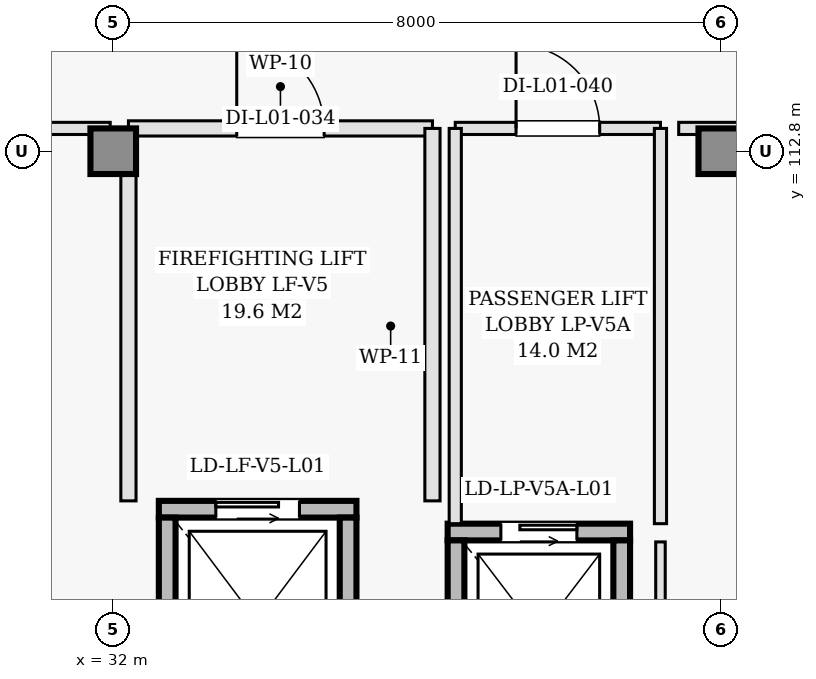
"""IFC4 building model, lengths in metres.
Left out: names, types, materials, properties, quantities, classifications, styles, units other than length and angle.
Written with IfcOpenShell. Run it as: python <this file> out.ifc"""

import sys

from ifc_helpers import new_model, si_unit, direction, frame, frame_2d, origin, origin_2d, place, context, subcontext, project, spatial, rectangle, extrude, element, fill, save


model = new_model("IFC4")
c1 = context("Model", 3, precision=1e-05, world=origin(), true_north=direction((0.0, 1.0)))
c2 = subcontext(c1, "Body", "Model", "MODEL_VIEW")
j1 = project(units=[si_unit("LENGTHUNIT", "METRE"), si_unit("PLANEANGLEUNIT", "RADIAN")], contexts=[c1])
p1 = place(None, origin())
s1 = spatial("IfcSite", under=j1, at=p1, CompositionType="ELEMENT")
p2 = place(p1, origin())
s2 = spatial("IfcBuilding", under=s1, at=p2, CompositionType="ELEMENT")
p3 = place(p2, frame((0.0, 0.0, 4.8)))
s3 = spatial("IfcBuildingStorey", under=s2, at=p3, CompositionType="ELEMENT", Elevation=4.8)
for number, where, z_axis, x_axis in (
    (1, (32.0, 112.8, 0.0), (0.0, 0.0, 1.0), (1.0, 0.0, 0.0)),
    (2, (40.0, 112.8, 0.0), (0.0, 0.0, 1.0), (1.0, 0.0, 0.0)),
):
    element("IfcColumn", number, at=place(p3, frame(where, z_axis=z_axis, x_axis=x_axis)), inside=s3, PredefinedType="COLUMN", context=c2, shape_type="SweptSolid", body=[
        extrude(rectangle(XDim=0.6, YDim=0.6, at=origin_2d()), origin(), (0.0, 0.0, 1.0), 4.8),
    ])
p4 = place(p3, frame((32.6, 108.09, 0.0), z_axis=(0.0, 0.0, 1.0), x_axis=(1.0, 0.0, 0.0)))
e3 = element("IfcWall", 3, at=p4, inside=s3, PredefinedType="SHEAR", context=c2, shape_type="SweptSolid", body=[
    extrude(rectangle(XDim=2.6, YDim=0.22, at=frame_2d((1.3, 0.0))), origin(), (0.0, 0.0, 1.0), 4.48),
])
p5 = place(p4, frame((0.75, 0.0, 0.0)))
e4 = element("IfcOpeningElement", 4, at=p5, cuts=e3, PredefinedType="OPENING", context=c2, shape_type="SweptSolid", body=[
    extrude(rectangle(XDim=1.1, YDim=2.15, at=frame_2d((0.55, 1.075))), frame((0.0, 0.12, 0.0), z_axis=(0.0, -1.0, 0.0), x_axis=(1.0, 0.0, 0.0)), (0.0, 0.0, 1.0), 0.24),
])
for number, where, z_axis, x_axis in (
    (5, (32.71, 105.22, 0.0), (0.0, 0.0, 1.0), (0.0, 1.0, 0.0)),
    (6, (35.09, 105.22, 0.0), (0.0, 0.0, 1.0), (0.0, 1.0, 0.0)),
):
    element("IfcWall", number, at=place(p3, frame(where, z_axis=z_axis, x_axis=x_axis)), inside=s3, PredefinedType="SHEAR", context=c2, shape_type="SweptSolid", body=[
        extrude(rectangle(XDim=2.76, YDim=0.22, at=frame_2d((1.38, 0.0))), origin(), (0.0, 0.0, 1.0), 4.48),
    ])
p6 = place(p3, frame((32.2, 113.1, 0.0), z_axis=(0.0, 0.0, 1.0), x_axis=(1.0, 0.0, 0.0)))
e7 = element("IfcWall", 7, at=p6, inside=s3, PredefinedType="PARTITIONING", context=c2, shape_type="SweptSolid", body=[
    extrude(rectangle(XDim=4.0, YDim=0.2, at=frame_2d((2.0, 0.0))), origin(), (0.0, 0.0, 1.0), 3.715),
])
p7 = place(p6, frame((1.425, 0.0, 0.0)))
e8 = element("IfcOpeningElement", 8, at=p7, cuts=e7, PredefinedType="OPENING", context=c2, shape_type="SweptSolid", body=[
    extrude(rectangle(XDim=1.15, YDim=2.15, at=frame_2d((0.575, 1.075))), frame((0.0, 0.11, 0.0), z_axis=(0.0, -1.0, 0.0), x_axis=(1.0, 0.0, 0.0)), (0.0, 0.0, 1.0), 0.22),
])
for number, where, z_axis, x_axis in (
    (9, (32.2, 108.2, 0.0), (0.0, 0.0, 1.0), (0.0, 1.0, 0.0)),
    (10, (36.2, 108.2, 0.0), (0.0, 0.0, 1.0), (0.0, 1.0, 0.0)),
):
    element("IfcWall", number, at=place(p3, frame(where, z_axis=z_axis, x_axis=x_axis)), inside=s3, PredefinedType="PARTITIONING", context=c2, shape_type="SweptSolid", body=[
        extrude(rectangle(XDim=4.9, YDim=0.2, at=frame_2d((2.45, 0.0))), origin(), (0.0, 0.0, 1.0), 3.715),
    ])
p8 = place(p3, frame((36.4, 107.79, 0.0), z_axis=(0.0, 0.0, 1.0), x_axis=(1.0, 0.0, 0.0)))
e11 = element("IfcWall", 11, at=p8, inside=s3, PredefinedType="SHEAR", context=c2, shape_type="SweptSolid", body=[
    extrude(rectangle(XDim=2.4, YDim=0.22, at=frame_2d((1.2, 0.0))), origin(), (0.0, 0.0, 1.0), 4.48),
])
p9 = place(p8, frame((0.7, 0.0, 0.0)))
e12 = element("IfcOpeningElement", 12, at=p9, cuts=e11, PredefinedType="OPENING", context=c2, shape_type="SweptSolid", body=[
    extrude(rectangle(XDim=1.0, YDim=2.15, at=frame_2d((0.5, 1.075))), frame((0.0, 0.12, 0.0), z_axis=(0.0, -1.0, 0.0), x_axis=(1.0, 0.0, 0.0)), (0.0, 0.0, 1.0), 0.24),
])
for number, where, z_axis, x_axis in (
    (13, (36.51, 105.22, 0.0), (0.0, 0.0, 1.0), (0.0, 1.0, 0.0)),
    (14, (38.69, 105.22, 0.0), (0.0, 0.0, 1.0), (0.0, 1.0, 0.0)),
):
    element("IfcWall", number, at=place(p3, frame(where, z_axis=z_axis, x_axis=x_axis)), inside=s3, PredefinedType="SHEAR", context=c2, shape_type="SweptSolid", body=[
        extrude(rectangle(XDim=2.46, YDim=0.22, at=frame_2d((1.23, 0.0))), origin(), (0.0, 0.0, 1.0), 4.48),
    ])
p10 = place(p3, frame((36.5, 113.1, 0.0), z_axis=(0.0, 0.0, 1.0), x_axis=(1.0, 0.0, 0.0)))
e15 = element("IfcWall", 15, at=p10, inside=s3, PredefinedType="PARTITIONING", context=c2, shape_type="SweptSolid", body=[
    extrude(rectangle(XDim=2.7, YDim=0.16, at=frame_2d((1.35, 0.0))), origin(), (0.0, 0.0, 1.0), 3.715),
])
p11 = place(p10, frame((0.8, 0.0, 0.0)))
e16 = element("IfcOpeningElement", 16, at=p11, cuts=e15, PredefinedType="OPENING", context=c2, shape_type="SweptSolid", body=[
    extrude(rectangle(XDim=1.1, YDim=2.15, at=frame_2d((0.55, 1.075))), frame((0.0, 0.09, 0.0), z_axis=(0.0, -1.0, 0.0), x_axis=(1.0, 0.0, 0.0)), (0.0, 0.0, 1.0), 0.18),
])
for number, where, z_axis, x_axis in (
    (17, (36.5, 107.9, 0.0), (0.0, 0.0, 1.0), (0.0, 1.0, 0.0)),
    (18, (39.2, 107.9, 0.0), (0.0, 0.0, 1.0), (0.0, 1.0, 0.0)),
):
    element("IfcWall", number, at=place(p3, frame(where, z_axis=z_axis, x_axis=x_axis)), inside=s3, PredefinedType="PARTITIONING", context=c2, shape_type="SweptSolid", body=[
        extrude(rectangle(XDim=5.2, YDim=0.16, at=frame_2d((2.6, 0.0))), origin(), (0.0, 0.0, 1.0), 3.715),
    ])
p12 = place(p3, frame((39.44, 113.1, 0.0), z_axis=(0.0, 0.0, 1.0), x_axis=(1.0, 0.0, 0.0)))
e19 = element("IfcWall", 19, at=p12, inside=s3, PredefinedType="PARTITIONING", context=c2, shape_type="SweptSolid", body=[
    extrude(rectangle(XDim=38.014, YDim=0.16, at=frame_2d((19.007, 0.0))), origin(), (0.0, 0.0, 1.0), 3.565),
])
p13 = place(p3, frame((39.2, 95.105, 0.0), z_axis=(0.0, 0.0, 1.0), x_axis=(0.0, 1.0, 0.0)))
e20 = element("IfcWall", 20, at=p13, inside=s3, PredefinedType="PARTITIONING", context=c2, shape_type="SweptSolid", body=[
    extrude(rectangle(XDim=12.555, YDim=0.125, at=frame_2d((6.277, 0.0))), origin(), (0.0, 0.0, 1.0), 3.715),
])
p14 = place(p3, frame((29.087, 113.1, 0.0), z_axis=(0.0, 0.0, 1.0), x_axis=(1.0, 0.0, 0.0)))
e21 = element("IfcWall", 21, at=p14, inside=s3, PredefinedType="PARTITIONING", context=c2, shape_type="SweptSolid", body=[
    extrude(rectangle(XDim=2.873, YDim=0.16, at=frame_2d((1.437, 0.0))), origin(), (0.0, 0.0, 1.0), 3.815),
])
p15 = place(p5, origin())
e22 = element("IfcDoor", 22, at=p15, inside=s3, OperationType="SLIDING_TO_LEFT", PredefinedType="DOOR", context=c2, shape_type="SweptSolid", body=[
    extrude(rectangle(XDim=1.1, YDim=2.15, at=frame_2d((0.55, 1.075))), frame((0.0, 0.025, 0.0), z_axis=(0.0, -1.0, 0.0), x_axis=(1.0, 0.0, 0.0)), (0.0, 0.0, 1.0), 0.05),
])
fill(e4, e22)
p16 = place(p7, origin())
e23 = element("IfcDoor", 23, at=p16, inside=s3, OperationType="SINGLE_SWING_LEFT", PredefinedType="DOOR", context=c2, shape_type="SweptSolid", body=[
    extrude(rectangle(XDim=1.15, YDim=2.15, at=frame_2d((0.575, 1.075))), frame((0.0, 0.025, 0.0), z_axis=(0.0, -1.0, 0.0), x_axis=(1.0, 0.0, 0.0)), (0.0, 0.0, 1.0), 0.05),
])
fill(e8, e23)
p17 = place(p9, origin())
e24 = element("IfcDoor", 24, at=p17, inside=s3, OperationType="SLIDING_TO_RIGHT", PredefinedType="DOOR", context=c2, shape_type="SweptSolid", body=[
    extrude(rectangle(XDim=1.0, YDim=2.15, at=frame_2d((0.5, 1.075))), frame((0.0, 0.025, 0.0), z_axis=(0.0, -1.0, 0.0), x_axis=(1.0, 0.0, 0.0)), (0.0, 0.0, 1.0), 0.05),
])
fill(e12, e24)
p18 = place(p11, origin())
e25 = element("IfcDoor", 25, at=p18, inside=s3, OperationType="SINGLE_SWING_LEFT", PredefinedType="DOOR", context=c2, shape_type="SweptSolid", body=[
    extrude(rectangle(XDim=1.1, YDim=2.15, at=frame_2d((0.55, 1.075))), frame((0.0, 0.025, 0.0), z_axis=(0.0, -1.0, 0.0), x_axis=(1.0, 0.0, 0.0)), (0.0, 0.0, 1.0), 0.05),
])
fill(e16, e25)
save(model, sys.argv[1])
